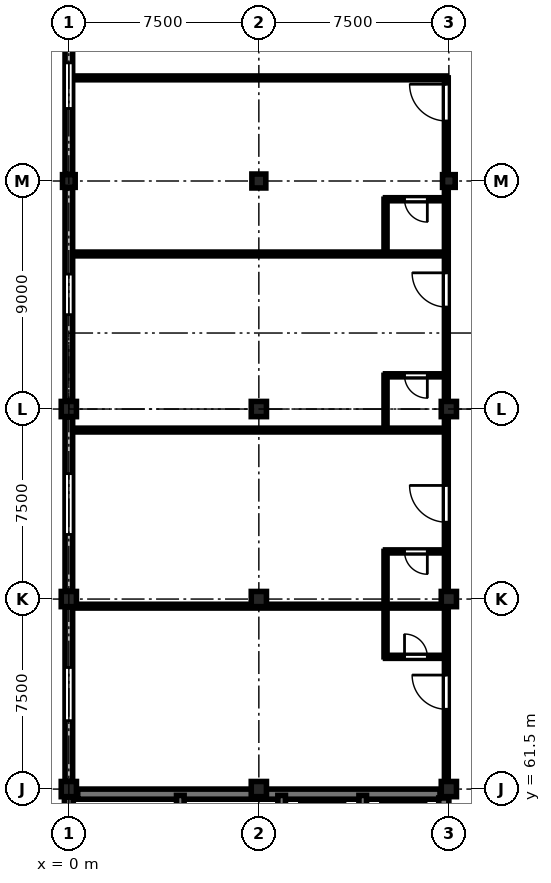
"""IFC4 building model, lengths in metres.
Left out: names, types, materials, properties, quantities, classifications, styles, units other than length and angle.
Written with IfcOpenShell. Run it as: python <this file> out.ifc"""

import sys

from ifc_helpers import new_model, si_unit, direction, frame, frame_2d, origin, origin_2d, place, context, subcontext, project, spatial, rectangle, circle, extrude, element, fill, save


model = new_model("IFC4")
c1 = context("Model", 3, precision=1e-05, world=origin(), true_north=direction((0.0, 1.0)))
c2 = subcontext(c1, "Body", "Model", "MODEL_VIEW")
j1 = project(units=[si_unit("LENGTHUNIT", "METRE"), si_unit("PLANEANGLEUNIT", "RADIAN")], contexts=[c1])
p1 = place(None, origin())
s1 = spatial("IfcSite", under=j1, at=p1, CompositionType="ELEMENT")
p2 = place(p1, origin())
s2 = spatial("IfcBuilding", under=s1, at=p2, CompositionType="ELEMENT")
p3 = place(p2, frame((0.0, 0.0, 21.9)))
s3 = spatial("IfcBuildingStorey", under=s2, at=p3, CompositionType="ELEMENT", Elevation=21.9)
p4 = place(p3, frame((0.0, 61.5, 0.0), z_axis=(0.0, 0.0, 1.0), x_axis=(1.0, 0.0, 0.0)))
e1 = element("IfcColumn", 1, at=p4, inside=s3, PredefinedType="COLUMN", context=c2, shape_type="SweptSolid", body=[
    extrude(rectangle(XDim=0.6, YDim=0.6, at=origin_2d()), origin(), (0.0, 0.0, 1.0), 4.05),
])
p5 = place(p3, frame((0.0, 69.0, 0.0), z_axis=(0.0, 0.0, 1.0), x_axis=(1.0, 0.0, 0.0)))
e2 = element("IfcColumn", 2, at=p5, inside=s3, PredefinedType="COLUMN", context=c2, shape_type="SweptSolid", body=[
    extrude(circle(Radius=0.3, at=origin_2d()), origin(), (0.0, 0.0, 1.0), 4.05),
])
p6 = place(p3, frame((0.0, 76.5, 0.0), z_axis=(0.0, 0.0, 1.0), x_axis=(1.0, 0.0, 0.0)))
e3 = element("IfcColumn", 3, at=p6, inside=s3, PredefinedType="COLUMN", context=c2, shape_type="SweptSolid", body=[
    extrude(rectangle(XDim=0.6, YDim=0.6, at=origin_2d()), origin(), (0.0, 0.0, 1.0), 4.05),
])
p7 = place(p3, frame((0.0, 85.5, 0.0), z_axis=(0.0, 0.0, 1.0), x_axis=(1.0, 0.0, 0.0)))
e4 = element("IfcColumn", 4, at=p7, inside=s3, PredefinedType="COLUMN", context=c2, shape_type="SweptSolid", body=[
    extrude(rectangle(XDim=0.5, YDim=0.5, at=origin_2d()), origin(), (0.0, 0.0, 1.0), 4.05),
])
p8 = place(p3, frame((7.5, 61.5, 0.0), z_axis=(0.0, 0.0, 1.0), x_axis=(1.0, 0.0, 0.0)))
e5 = element("IfcColumn", 5, at=p8, inside=s3, PredefinedType="COLUMN", context=c2, shape_type="SweptSolid", body=[
    extrude(circle(Radius=0.3, at=origin_2d()), origin(), (0.0, 0.0, 1.0), 4.05),
])
for number, where, z_axis, x_axis in (
    (6, (7.5, 69.0, 0.0), (0.0, 0.0, 1.0), (1.0, 0.0, 0.0)),
    (7, (7.5, 76.5, 0.0), (0.0, 0.0, 1.0), (1.0, 0.0, 0.0)),
):
    element("IfcColumn", number, at=place(p3, frame(where, z_axis=z_axis, x_axis=x_axis)), inside=s3, PredefinedType="COLUMN", context=c2, shape_type="SweptSolid", body=[
        extrude(rectangle(XDim=0.6, YDim=0.6, at=origin_2d()), origin(), (0.0, 0.0, 1.0), 4.05),
    ])
p9 = place(p3, frame((7.5, 85.5, 0.0), z_axis=(0.0, 0.0, 1.0), x_axis=(1.0, 0.0, 0.0)))
e8 = element("IfcColumn", 8, at=p9, inside=s3, PredefinedType="COLUMN", context=c2, shape_type="SweptSolid", body=[
    extrude(rectangle(XDim=0.55, YDim=0.55, at=origin_2d()), origin(), (0.0, 0.0, 1.0), 4.05),
])
for number, where, z_axis, x_axis in (
    (9, (15.0, 61.5, 0.0), (0.0, 0.0, 1.0), (1.0, 0.0, 0.0)),
    (10, (15.0, 69.0, 0.0), (0.0, 0.0, 1.0), (1.0, 0.0, 0.0)),
):
    element("IfcColumn", number, at=place(p3, frame(where, z_axis=z_axis, x_axis=x_axis)), inside=s3, PredefinedType="COLUMN", context=c2, shape_type="SweptSolid", body=[
        extrude(rectangle(XDim=0.6, YDim=0.6, at=origin_2d()), origin(), (0.0, 0.0, 1.0), 4.05),
    ])
p10 = place(p3, frame((15.0, 76.5, 0.0), z_axis=(0.0, 0.0, 1.0), x_axis=(1.0, 0.0, 0.0)))
e11 = element("IfcColumn", 11, at=p10, inside=s3, PredefinedType="COLUMN", context=c2, shape_type="SweptSolid", body=[
    extrude(circle(Radius=0.3, at=origin_2d()), origin(), (0.0, 0.0, 1.0), 4.05),
])
p11 = place(p3, frame((15.0, 85.5, 0.0), z_axis=(0.0, 0.0, 1.0), x_axis=(1.0, 0.0, 0.0)))
e12 = element("IfcColumn", 12, at=p11, inside=s3, PredefinedType="COLUMN", context=c2, shape_type="SweptSolid", body=[
    extrude(rectangle(XDim=0.5, YDim=0.5, at=origin_2d()), origin(), (0.0, 0.0, 1.0), 4.05),
])
p12 = place(p3, frame((0.0, 54.31, 0.0), z_axis=(0.0, 0.0, 1.0), x_axis=(0.0, 1.0, 0.0)))
e13 = element("IfcWall", 13, at=p12, inside=s3, PredefinedType="SHEAR", context=c2, shape_type="SweptSolid", body=[
    extrude(rectangle(XDim=6.88, YDim=0.35, at=frame_2d((3.44, 0.0))), origin(), (0.0, 0.0, 1.0), 3.77),
])
p13 = place(p3, frame((0.0, 61.81, 0.0), z_axis=(0.0, 0.0, 1.0), x_axis=(0.0, 1.0, 0.0)))
e14 = element("IfcWall", 14, at=p13, inside=s3, PredefinedType="STANDARD", context=c2, shape_type="SweptSolid", body=[
    extrude(rectangle(XDim=6.88, YDim=0.3, at=frame_2d((3.44, 0.0))), origin(), (0.0, 0.0, 1.0), 3.17),
])
p14 = place(p13, frame((2.39, 0.0, 0.9)))
e15 = element("IfcOpeningElement", 15, at=p14, cuts=e14, PredefinedType="OPENING", context=c2, shape_type="SweptSolid", body=[
    extrude(rectangle(XDim=2.1, YDim=1.99, at=frame_2d((1.05, 0.995))), frame((0.0, 0.16, 0.0), z_axis=(0.0, -1.0, 0.0), x_axis=(1.0, 0.0, 0.0)), (0.0, 0.0, 1.0), 0.32),
])
p15 = place(p3, frame((0.0, 69.31, 0.0), z_axis=(0.0, 0.0, 1.0), x_axis=(0.0, 1.0, 0.0)))
e16 = element("IfcWall", 16, at=p15, inside=s3, PredefinedType="STANDARD", context=c2, shape_type="SweptSolid", body=[
    extrude(rectangle(XDim=6.88, YDim=0.3, at=frame_2d((3.44, 0.0))), origin(), (0.0, 0.0, 1.0), 3.17),
])
p16 = place(p15, frame((2.24, 0.0, 0.9)))
e17 = element("IfcOpeningElement", 17, at=p16, cuts=e16, PredefinedType="OPENING", context=c2, shape_type="SweptSolid", body=[
    extrude(rectangle(XDim=2.4, YDim=1.99, at=frame_2d((1.2, 0.995))), frame((0.0, 0.16, 0.0), z_axis=(0.0, -1.0, 0.0), x_axis=(1.0, 0.0, 0.0)), (0.0, 0.0, 1.0), 0.32),
])
p17 = place(p3, frame((0.0, 76.81, 0.0), z_axis=(0.0, 0.0, 1.0), x_axis=(0.0, 1.0, 0.0)))
e18 = element("IfcWall", 18, at=p17, inside=s3, PredefinedType="STANDARD", context=c2, shape_type="SweptSolid", body=[
    extrude(rectangle(XDim=8.43, YDim=0.3, at=frame_2d((4.215, 0.0))), origin(), (0.0, 0.0, 1.0), 3.22),
])
p18 = place(p17, frame((3.415, 0.0, 0.9)))
e19 = element("IfcOpeningElement", 19, at=p18, cuts=e18, PredefinedType="OPENING", context=c2, shape_type="SweptSolid", body=[
    extrude(rectangle(XDim=1.6, YDim=1.95, at=frame_2d((0.8, 0.975))), frame((0.0, 0.16, 0.0), z_axis=(0.0, -1.0, 0.0), x_axis=(1.0, 0.0, 0.0)), (0.0, 0.0, 1.0), 0.32),
])
p19 = place(p3, frame((0.0, 85.76, 0.0), z_axis=(0.0, 0.0, 1.0), x_axis=(0.0, 1.0, 0.0)))
e20 = element("IfcWall", 20, at=p19, inside=s3, PredefinedType="STANDARD", context=c2, shape_type="SweptSolid", body=[
    extrude(rectangle(XDim=7.005, YDim=0.3, at=frame_2d((3.502, 0.0))), origin(), (0.0, 0.0, 1.0), 3.17),
])
p20 = place(p19, frame((2.603, 0.0, 0.9)))
e21 = element("IfcOpeningElement", 21, at=p20, cuts=e20, PredefinedType="OPENING", context=c2, shape_type="SweptSolid", body=[
    extrude(rectangle(XDim=1.8, YDim=1.95, at=frame_2d((0.9, 0.975))), frame((0.0, 0.16, 0.0), z_axis=(0.0, -1.0, 0.0), x_axis=(1.0, 0.0, 0.0)), (0.0, 0.0, 1.0), 0.32),
])
p21 = place(p3, frame((0.35, 61.3, 0.0), z_axis=(0.0, 0.0, 1.0), x_axis=(1.0, 0.0, 0.0)))
e22 = element("IfcWall", 22, at=p21, inside=s3, PredefinedType="SHEAR", context=c2, shape_type="SweptSolid", body=[
    extrude(rectangle(XDim=14.3, YDim=0.4, at=frame_2d((7.15, 0.0))), origin(), (0.0, 0.0, 1.0), 3.77),
])
p22 = place(p3, frame((14.8, 58.1, 0.0), z_axis=(0.0, 0.0, 1.0), x_axis=(0.0, 1.0, 0.0)))
e23 = element("IfcWall", 23, at=p22, inside=s3, PredefinedType="SHEAR", context=c2, shape_type="SweptSolid", body=[
    extrude(rectangle(XDim=3.05, YDim=0.4, at=frame_2d((1.525, 0.0))), origin(), (0.0, 0.0, 1.0), 3.77),
])
for number, where, z_axis, x_axis in (
    (24, (4.4, 58.1, 0.0), (0.0, 0.0, 1.0), (0.0, 1.0, 0.0)),
    (25, (8.4, 58.1, 0.0), (0.0, 0.0, 1.0), (0.0, 1.0, 0.0)),
    (26, (11.6, 58.1, 0.0), (0.0, 0.0, 1.0), (0.0, 1.0, 0.0)),
):
    element("IfcWall", number, at=place(p3, frame(where, z_axis=z_axis, x_axis=x_axis)), inside=s3, PredefinedType="SHEAR", context=c2, shape_type="SweptSolid", body=[
        extrude(rectangle(XDim=3.15, YDim=0.3, at=frame_2d((1.575, 0.0))), origin(), (0.0, 0.0, 1.0), 3.77),
    ])
p23 = place(p3, frame((14.9, 61.93, 0.0), z_axis=(0.0, 0.0, 1.0), x_axis=(0.0, 1.0, 0.0)))
e27 = element("IfcWall", 27, at=p23, inside=s3, PredefinedType="PARTITIONING", context=c2, shape_type="SweptSolid", body=[
    extrude(rectangle(XDim=6.79, YDim=0.15, at=frame_2d((3.395, 0.0))), origin(), (0.0, 0.0, 1.0), 3.205),
])
p24 = place(p23, frame((2.72, 0.0, 0.0)))
e28 = element("IfcOpeningElement", 28, at=p24, cuts=e27, PredefinedType="OPENING", context=c2, shape_type="SweptSolid", body=[
    extrude(rectangle(XDim=1.35, YDim=2.25, at=frame_2d((0.675, 1.125))), frame((0.0, 0.085, 0.0), z_axis=(0.0, -1.0, 0.0), x_axis=(1.0, 0.0, 0.0)), (0.0, 0.0, 1.0), 0.17),
])
p25 = place(p3, frame((12.5, 66.72, 0.0), z_axis=(0.0, 0.0, 1.0), x_axis=(1.0, 0.0, 0.0)))
e29 = element("IfcWall", 29, at=p25, inside=s3, PredefinedType="PARTITIONING", context=c2, shape_type="SweptSolid", body=[
    extrude(rectangle(XDim=2.4, YDim=0.12, at=frame_2d((1.2, 0.0))), origin(), (0.0, 0.0, 1.0), 3.755),
])
p26 = place(p25, frame((0.75, 0.0, 0.0)))
e30 = element("IfcOpeningElement", 30, at=p26, cuts=e29, PredefinedType="OPENING", context=c2, shape_type="SweptSolid", body=[
    extrude(rectangle(XDim=0.9, YDim=2.1, at=frame_2d((0.45, 1.05))), frame((0.0, 0.07, 0.0), z_axis=(0.0, -1.0, 0.0), x_axis=(1.0, 0.0, 0.0)), (0.0, 0.0, 1.0), 0.14),
])
p27 = place(p3, frame((12.5, 66.72, 0.0), z_axis=(0.0, 0.0, 1.0), x_axis=(0.0, 1.0, 0.0)))
e31 = element("IfcWall", 31, at=p27, inside=s3, PredefinedType="PARTITIONING", context=c2, shape_type="SweptSolid", body=[
    extrude(rectangle(XDim=2.0, YDim=0.12, at=frame_2d((1.0, 0.0))), origin(), (0.0, 0.0, 1.0), 3.755),
])
p28 = place(p3, frame((14.9, 68.88, 0.0), z_axis=(0.0, 0.0, 1.0), x_axis=(0.0, 1.0, 0.0)))
e32 = element("IfcWall", 32, at=p28, inside=s3, PredefinedType="PARTITIONING", context=c2, shape_type="SweptSolid", body=[
    extrude(rectangle(XDim=6.79, YDim=0.15, at=frame_2d((3.395, 0.0))), origin(), (0.0, 0.0, 1.0), 3.255),
])
p29 = place(p28, frame((3.154, 0.0, 0.0)))
e33 = element("IfcOpeningElement", 33, at=p29, cuts=e32, PredefinedType="OPENING", context=c2, shape_type="SweptSolid", body=[
    extrude(rectangle(XDim=1.45, YDim=2.3, at=frame_2d((0.725, 1.15))), frame((0.0, 0.085, 0.0), z_axis=(0.0, -1.0, 0.0), x_axis=(1.0, 0.0, 0.0)), (0.0, 0.0, 1.0), 0.17),
])
p30 = place(p3, frame((14.9, 70.88, 0.0), z_axis=(0.0, 0.0, 1.0), x_axis=(-1.0, 0.0, 0.0)))
e34 = element("IfcWall", 34, at=p30, inside=s3, PredefinedType="PARTITIONING", context=c2, shape_type="SweptSolid", body=[
    extrude(rectangle(XDim=2.4, YDim=0.12, at=frame_2d((1.2, 0.0))), origin(), (0.0, 0.0, 1.0), 3.755),
])
p31 = place(p30, frame((0.75, 0.0, 0.0)))
e35 = element("IfcOpeningElement", 35, at=p31, cuts=e34, PredefinedType="OPENING", context=c2, shape_type="SweptSolid", body=[
    extrude(rectangle(XDim=0.9, YDim=2.1, at=frame_2d((0.45, 1.05))), frame((0.0, 0.07, 0.0), z_axis=(0.0, -1.0, 0.0), x_axis=(1.0, 0.0, 0.0)), (0.0, 0.0, 1.0), 0.14),
])
p32 = place(p3, frame((12.5, 68.88, 0.0), z_axis=(0.0, 0.0, 1.0), x_axis=(0.0, 1.0, 0.0)))
e36 = element("IfcWall", 36, at=p32, inside=s3, PredefinedType="PARTITIONING", context=c2, shape_type="SweptSolid", body=[
    extrude(rectangle(XDim=2.0, YDim=0.12, at=frame_2d((1.0, 0.0))), origin(), (0.0, 0.0, 1.0), 3.755),
])
p33 = place(p3, frame((14.9, 75.83, 0.0), z_axis=(0.0, 0.0, 1.0), x_axis=(0.0, 1.0, 0.0)))
e37 = element("IfcWall", 37, at=p33, inside=s3, PredefinedType="PARTITIONING", context=c2, shape_type="SweptSolid", body=[
    extrude(rectangle(XDim=6.79, YDim=0.15, at=frame_2d((3.395, 0.0))), origin(), (0.0, 0.0, 1.0), 3.055),
])
p34 = place(p33, frame((4.696, 0.0, 0.0)))
e38 = element("IfcOpeningElement", 38, at=p34, cuts=e37, PredefinedType="OPENING", context=c2, shape_type="SweptSolid", body=[
    extrude(rectangle(XDim=1.35, YDim=2.25, at=frame_2d((0.675, 1.125))), frame((0.0, 0.085, 0.0), z_axis=(0.0, -1.0, 0.0), x_axis=(1.0, 0.0, 0.0)), (0.0, 0.0, 1.0), 0.17),
])
p35 = place(p3, frame((14.9, 77.83, 0.0), z_axis=(0.0, 0.0, 1.0), x_axis=(-1.0, 0.0, 0.0)))
e39 = element("IfcWall", 39, at=p35, inside=s3, PredefinedType="PARTITIONING", context=c2, shape_type="SweptSolid", body=[
    extrude(rectangle(XDim=2.4, YDim=0.12, at=frame_2d((1.2, 0.0))), origin(), (0.0, 0.0, 1.0), 3.755),
])
p36 = place(p35, frame((0.75, 0.0, 0.0)))
e40 = element("IfcOpeningElement", 40, at=p36, cuts=e39, PredefinedType="OPENING", context=c2, shape_type="SweptSolid", body=[
    extrude(rectangle(XDim=0.9, YDim=2.1, at=frame_2d((0.45, 1.05))), frame((0.0, 0.07, 0.0), z_axis=(0.0, -1.0, 0.0), x_axis=(1.0, 0.0, 0.0)), (0.0, 0.0, 1.0), 0.14),
])
p37 = place(p3, frame((12.5, 75.83, 0.0), z_axis=(0.0, 0.0, 1.0), x_axis=(0.0, 1.0, 0.0)))
e41 = element("IfcWall", 41, at=p37, inside=s3, PredefinedType="PARTITIONING", context=c2, shape_type="SweptSolid", body=[
    extrude(rectangle(XDim=2.0, YDim=0.12, at=frame_2d((1.0, 0.0))), origin(), (0.0, 0.0, 1.0), 3.755),
])
p38 = place(p3, frame((14.9, 82.78, 0.0), z_axis=(0.0, 0.0, 1.0), x_axis=(0.0, 1.0, 0.0)))
e42 = element("IfcWall", 42, at=p38, inside=s3, PredefinedType="PARTITIONING", context=c2, shape_type="SweptSolid", body=[
    extrude(rectangle(XDim=6.79, YDim=0.15, at=frame_2d((3.395, 0.0))), origin(), (0.0, 0.0, 1.0), 3.055),
])
p39 = place(p38, frame((5.09, 0.0, 0.0)))
e43 = element("IfcOpeningElement", 43, at=p39, cuts=e42, PredefinedType="OPENING", context=c2, shape_type="SweptSolid", body=[
    extrude(rectangle(XDim=1.45, YDim=2.3, at=frame_2d((0.725, 1.15))), frame((0.0, 0.085, 0.0), z_axis=(0.0, -1.0, 0.0), x_axis=(1.0, 0.0, 0.0)), (0.0, 0.0, 1.0), 0.17),
])
p40 = place(p3, frame((14.9, 84.78, 0.0), z_axis=(0.0, 0.0, 1.0), x_axis=(-1.0, 0.0, 0.0)))
e44 = element("IfcWall", 44, at=p40, inside=s3, PredefinedType="PARTITIONING", context=c2, shape_type="SweptSolid", body=[
    extrude(rectangle(XDim=2.4, YDim=0.12, at=frame_2d((1.2, 0.0))), origin(), (0.0, 0.0, 1.0), 3.755),
])
p41 = place(p40, frame((0.75, 0.0, 0.0)))
e45 = element("IfcOpeningElement", 45, at=p41, cuts=e44, PredefinedType="OPENING", context=c2, shape_type="SweptSolid", body=[
    extrude(rectangle(XDim=0.9, YDim=2.1, at=frame_2d((0.45, 1.05))), frame((0.0, 0.07, 0.0), z_axis=(0.0, -1.0, 0.0), x_axis=(1.0, 0.0, 0.0)), (0.0, 0.0, 1.0), 0.14),
])
p42 = place(p3, frame((12.5, 82.78, 0.0), z_axis=(0.0, 0.0, 1.0), x_axis=(0.0, 1.0, 0.0)))
e46 = element("IfcWall", 46, at=p42, inside=s3, PredefinedType="PARTITIONING", context=c2, shape_type="SweptSolid", body=[
    extrude(rectangle(XDim=2.0, YDim=0.12, at=frame_2d((1.0, 0.0))), origin(), (0.0, 0.0, 1.0), 3.755),
])
p43 = place(p3, frame((0.35, 68.72, 0.0), z_axis=(0.0, 0.0, 1.0), x_axis=(1.0, 0.0, 0.0)))
e47 = element("IfcWall", 47, at=p43, inside=s3, PredefinedType="PARTITIONING", context=c2, shape_type="SweptSolid", body=[
    extrude(rectangle(XDim=14.55, YDim=0.15, at=frame_2d((7.275, 0.0))), origin(), (0.0, 0.0, 1.0), 3.155),
])
for number, where, z_axis, x_axis in (
    (48, (0.35, 75.67, 0.0), (0.0, 0.0, 1.0), (1.0, 0.0, 0.0)),
    (49, (0.35, 82.62, 0.0), (0.0, 0.0, 1.0), (1.0, 0.0, 0.0)),
    (50, (0.35, 89.57, 0.0), (0.0, 0.0, 1.0), (1.0, 0.0, 0.0)),
):
    element("IfcWall", number, at=place(p3, frame(where, z_axis=z_axis, x_axis=x_axis)), inside=s3, PredefinedType="PARTITIONING", context=c2, shape_type="SweptSolid", body=[
        extrude(rectangle(XDim=14.55, YDim=0.15, at=frame_2d((7.275, 0.0))), origin(), (0.0, 0.0, 1.0), 3.755),
    ])
p44 = place(p14, origin())
e51 = element("IfcWindow", 51, at=p44, inside=s3, PartitioningType="SINGLE_PANEL", PredefinedType="WINDOW", context=c2, shape_type="SweptSolid", body=[
    extrude(rectangle(XDim=2.1, YDim=1.99, at=frame_2d((1.05, 0.995))), frame((0.0, 0.03, 0.0), z_axis=(0.0, -1.0, 0.0), x_axis=(1.0, 0.0, 0.0)), (0.0, 0.0, 1.0), 0.06),
])
fill(e15, e51)
p45 = place(p16, origin())
e52 = element("IfcWindow", 52, at=p45, inside=s3, PartitioningType="SINGLE_PANEL", PredefinedType="WINDOW", context=c2, shape_type="SweptSolid", body=[
    extrude(rectangle(XDim=2.4, YDim=1.99, at=frame_2d((1.2, 0.995))), frame((0.0, 0.03, 0.0), z_axis=(0.0, -1.0, 0.0), x_axis=(1.0, 0.0, 0.0)), (0.0, 0.0, 1.0), 0.06),
])
fill(e17, e52)
p46 = place(p18, origin())
e53 = element("IfcWindow", 53, at=p46, inside=s3, PartitioningType="SINGLE_PANEL", PredefinedType="WINDOW", context=c2, shape_type="SweptSolid", body=[
    extrude(rectangle(XDim=1.6, YDim=1.95, at=frame_2d((0.8, 0.975))), frame((0.0, 0.03, 0.0), z_axis=(0.0, -1.0, 0.0), x_axis=(1.0, 0.0, 0.0)), (0.0, 0.0, 1.0), 0.06),
])
fill(e19, e53)
p47 = place(p20, origin())
e54 = element("IfcWindow", 54, at=p47, inside=s3, PartitioningType="SINGLE_PANEL", PredefinedType="WINDOW", context=c2, shape_type="SweptSolid", body=[
    extrude(rectangle(XDim=1.8, YDim=1.95, at=frame_2d((0.9, 0.975))), frame((0.0, 0.03, 0.0), z_axis=(0.0, -1.0, 0.0), x_axis=(1.0, 0.0, 0.0)), (0.0, 0.0, 1.0), 0.06),
])
fill(e21, e54)
p48 = place(p24, origin())
e55 = element("IfcDoor", 55, at=p48, inside=s3, OperationType="SINGLE_SWING_RIGHT", PredefinedType="DOOR", context=c2, shape_type="SweptSolid", body=[
    extrude(rectangle(XDim=1.35, YDim=2.25, at=frame_2d((0.675, 1.125))), frame((0.0, 0.025, 0.0), z_axis=(0.0, -1.0, 0.0), x_axis=(1.0, 0.0, 0.0)), (0.0, 0.0, 1.0), 0.05),
])
fill(e28, e55)
p49 = place(p26, origin())
e56 = element("IfcDoor", 56, at=p49, inside=s3, OperationType="SINGLE_SWING_LEFT", PredefinedType="DOOR", context=c2, shape_type="SweptSolid", body=[
    extrude(rectangle(XDim=0.9, YDim=2.1, at=frame_2d((0.45, 1.05))), frame((0.0, 0.025, 0.0), z_axis=(0.0, -1.0, 0.0), x_axis=(1.0, 0.0, 0.0)), (0.0, 0.0, 1.0), 0.05),
])
fill(e30, e56)
p50 = place(p29, origin())
e57 = element("IfcDoor", 57, at=p50, inside=s3, OperationType="SINGLE_SWING_RIGHT", PredefinedType="DOOR", context=c2, shape_type="SweptSolid", body=[
    extrude(rectangle(XDim=1.45, YDim=2.3, at=frame_2d((0.725, 1.15))), frame((0.0, 0.025, 0.0), z_axis=(0.0, -1.0, 0.0), x_axis=(1.0, 0.0, 0.0)), (0.0, 0.0, 1.0), 0.05),
])
fill(e33, e57)
p51 = place(p31, origin())
e58 = element("IfcDoor", 58, at=p51, inside=s3, OperationType="SINGLE_SWING_LEFT", PredefinedType="DOOR", context=c2, shape_type="SweptSolid", body=[
    extrude(rectangle(XDim=0.9, YDim=2.1, at=frame_2d((0.45, 1.05))), frame((0.0, 0.025, 0.0), z_axis=(0.0, -1.0, 0.0), x_axis=(1.0, 0.0, 0.0)), (0.0, 0.0, 1.0), 0.05),
])
fill(e35, e58)
p52 = place(p34, origin())
e59 = element("IfcDoor", 59, at=p52, inside=s3, OperationType="SINGLE_SWING_RIGHT", PredefinedType="DOOR", context=c2, shape_type="SweptSolid", body=[
    extrude(rectangle(XDim=1.35, YDim=2.25, at=frame_2d((0.675, 1.125))), frame((0.0, 0.025, 0.0), z_axis=(0.0, -1.0, 0.0), x_axis=(1.0, 0.0, 0.0)), (0.0, 0.0, 1.0), 0.05),
])
fill(e38, e59)
p53 = place(p36, origin())
e60 = element("IfcDoor", 60, at=p53, inside=s3, OperationType="SINGLE_SWING_LEFT", PredefinedType="DOOR", context=c2, shape_type="SweptSolid", body=[
    extrude(rectangle(XDim=0.9, YDim=2.1, at=frame_2d((0.45, 1.05))), frame((0.0, 0.025, 0.0), z_axis=(0.0, -1.0, 0.0), x_axis=(1.0, 0.0, 0.0)), (0.0, 0.0, 1.0), 0.05),
])
fill(e40, e60)
p54 = place(p39, origin())
e61 = element("IfcDoor", 61, at=p54, inside=s3, OperationType="SINGLE_SWING_RIGHT", PredefinedType="DOOR", context=c2, shape_type="SweptSolid", body=[
    extrude(rectangle(XDim=1.45, YDim=2.3, at=frame_2d((0.725, 1.15))), frame((0.0, 0.025, 0.0), z_axis=(0.0, -1.0, 0.0), x_axis=(1.0, 0.0, 0.0)), (0.0, 0.0, 1.0), 0.05),
])
fill(e43, e61)
p55 = place(p41, origin())
e62 = element("IfcDoor", 62, at=p55, inside=s3, OperationType="SINGLE_SWING_LEFT", PredefinedType="DOOR", context=c2, shape_type="SweptSolid", body=[
    extrude(rectangle(XDim=0.9, YDim=2.1, at=frame_2d((0.45, 1.05))), frame((0.0, 0.025, 0.0), z_axis=(0.0, -1.0, 0.0), x_axis=(1.0, 0.0, 0.0)), (0.0, 0.0, 1.0), 0.05),
])
fill(e45, e62)
save(model, sys.argv[1])
